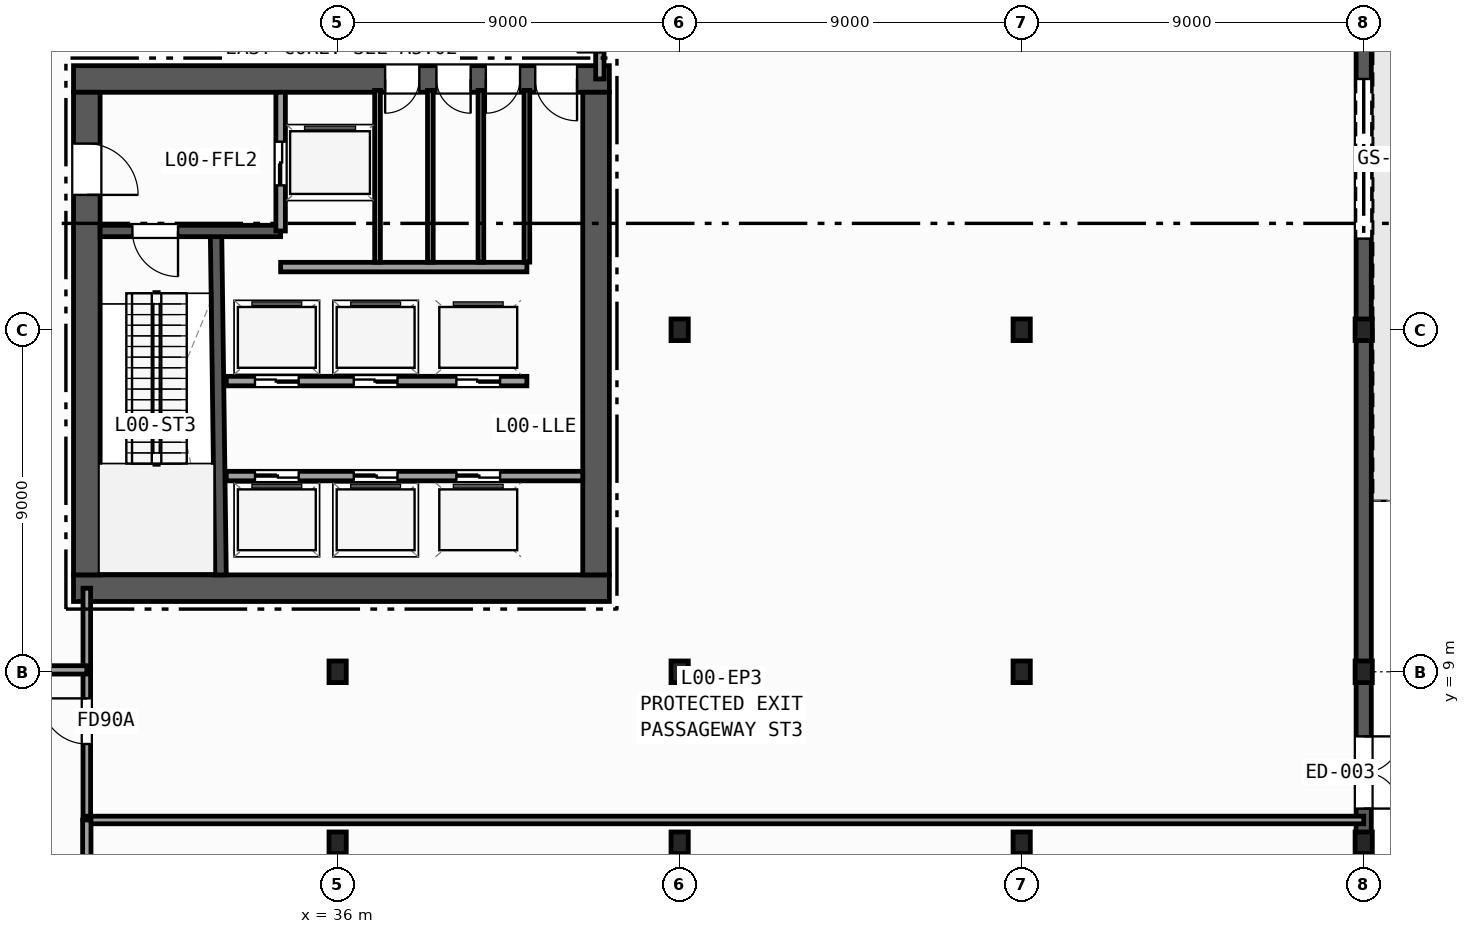
"""IFC4 building model, lengths in metres.
Left out: names, types, materials, properties, quantities, classifications, styles, units other than length and angle.
Written with IfcOpenShell. Run it as: python <this file> out.ifc"""

import sys

from ifc_helpers import new_model, si_unit, direction, frame, frame_2d, origin, origin_2d, place, context, subcontext, project, spatial, rectangle, i_section, extrude, element, fill, save


model = new_model("IFC4")
c1 = context("Model", 3, precision=1e-05, world=origin(), true_north=direction((0.0, 1.0)))
c2 = subcontext(c1, "Body", "Model", "MODEL_VIEW")
j1 = project(units=[si_unit("LENGTHUNIT", "METRE"), si_unit("PLANEANGLEUNIT", "RADIAN")], contexts=[c1])
p1 = place(None, origin())
s1 = spatial("IfcSite", under=j1, at=p1, CompositionType="ELEMENT")
p2 = place(p1, origin())
s2 = spatial("IfcBuilding", under=s1, at=p2, CompositionType="ELEMENT")
p3 = place(p2, origin())
s3 = spatial("IfcBuildingStorey", under=s2, at=p3, CompositionType="ELEMENT", Elevation=0.0)
for number, where, z_axis, x_axis in (
    (1, (36.0, 9.0, 0.0), (0.0, 0.0, 1.0), (1.0, 0.0, 0.0)),
    (2, (45.0, 9.0, 0.0), (0.0, 0.0, 1.0), (1.0, 0.0, 0.0)),
    (3, (45.0, 18.0, 0.0), (0.0, 0.0, 1.0), (1.0, 0.0, 0.0)),
    (4, (54.0, 9.0, 0.0), (0.0, 0.0, 1.0), (1.0, 0.0, 0.0)),
    (5, (54.0, 18.0, 0.0), (0.0, 0.0, 1.0), (1.0, 0.0, 0.0)),
    (6, (63.0, 9.0, 0.0), (0.0, 0.0, 1.0), (1.0, 0.0, 0.0)),
    (7, (63.0, 18.0, 0.0), (0.0, 0.0, 1.0), (1.0, 0.0, 0.0)),
    (8, (36.0, 4.5, 0.0), (0.0, 0.0, 1.0), (1.0, 0.0, 0.0)),
    (9, (45.0, 4.5, 0.0), (0.0, 0.0, 1.0), (1.0, 0.0, 0.0)),
    (10, (54.0, 4.5, 0.0), (0.0, 0.0, 1.0), (1.0, 0.0, 0.0)),
    (11, (63.0, 4.5, 0.0), (0.0, 0.0, 1.0), (1.0, 0.0, 0.0)),
):
    element("IfcColumn", number, at=place(p3, frame(where, z_axis=z_axis, x_axis=x_axis)), inside=s3, PredefinedType="COLUMN", context=c2, shape_type="SweptSolid", body=[
        extrude(i_section(OverallWidth=0.454, OverallDepth=0.569, WebThickness=0.078, FlangeThickness=0.125, FilletRadius=0.015, at=origin_2d()), origin(), (0.0, 0.0, 1.0), 5.8),
    ])
p4 = place(p3, frame((63.0, 54.2, 0.0), z_axis=(0.0, 0.0, 1.0), x_axis=(0.0, -1.0, 0.0)))
e12 = element("IfcWall", 12, at=p4, inside=s3, PredefinedType="SOLIDWALL", context=c2, shape_type="SweptSolid", body=[
    extrude(rectangle(XDim=54.4, YDim=0.4, at=frame_2d((27.2, 0.0))), origin(), (0.0, 0.0, 1.0), 5.48),
])
p5 = place(p4, frame((46.9, 0.0, 0.0)))
e13 = element("IfcOpeningElement", 13, at=p5, cuts=e12, PredefinedType="OPENING", context=c2, shape_type="SweptSolid", body=[
    extrude(rectangle(XDim=1.9, YDim=2.2, at=frame_2d((0.95, 1.1))), frame((0.0, 0.21, 0.0), z_axis=(0.0, -1.0, 0.0), x_axis=(1.0, 0.0, 0.0)), (0.0, 0.0, 1.0), 0.42),
])
p6 = place(p4, frame((12.4, 0.0, 0.0)))
e14 = element("IfcOpeningElement", 14, at=p6, cuts=e12, PredefinedType="OPENING", context=c2, shape_type="SweptSolid", body=[
    extrude(rectangle(XDim=1.6, YDim=2.2, at=frame_2d((0.8, 1.1))), frame((0.0, 0.21, 0.0), z_axis=(0.0, -1.0, 0.0), x_axis=(1.0, 0.0, 0.0)), (0.0, 0.0, 1.0), 0.42),
])
p7 = place(p4, frame((21.4, 0.0, 0.0)))
e15 = element("IfcOpeningElement", 15, at=p7, cuts=e12, PredefinedType="OPENING", context=c2, shape_type="SweptSolid", body=[
    extrude(rectangle(XDim=1.6, YDim=2.2, at=frame_2d((0.8, 1.1))), frame((0.0, 0.21, 0.0), z_axis=(0.0, -1.0, 0.0), x_axis=(1.0, 0.0, 0.0)), (0.0, 0.0, 1.0), 0.42),
])
p8 = place(p4, frame((29.6, 0.0, 0.0)))
e16 = element("IfcOpeningElement", 16, at=p8, cuts=e12, PredefinedType="OPENING", context=c2, shape_type="SweptSolid", body=[
    extrude(rectangle(XDim=4.2, YDim=3.8, at=frame_2d((2.1, 1.9))), frame((0.0, 0.21, 0.0), z_axis=(0.0, -1.0, 0.0), x_axis=(1.0, 0.0, 0.0)), (0.0, 0.0, 1.0), 0.42),
])
p9 = place(p3, frame((43.15, 11.2, 0.0), z_axis=(0.0, 0.0, 1.0), x_axis=(-1.0, 0.0, 0.0)))
e17 = element("IfcWall", 17, at=p9, inside=s3, PredefinedType="SHEAR", context=c2, shape_type="SweptSolid", body=[
    extrude(rectangle(XDim=14.1, YDim=0.7, at=frame_2d((7.05, 0.0))), origin(), (0.0, 0.0, 1.0), 5.48),
])
p10 = place(p3, frame((43.15, 24.6, 0.0), z_axis=(0.0, 0.0, 1.0), x_axis=(-1.0, 0.0, 0.0)))
e18 = element("IfcWall", 18, at=p10, inside=s3, PredefinedType="SHEAR", context=c2, shape_type="SweptSolid", body=[
    extrude(rectangle(XDim=14.1, YDim=0.7, at=frame_2d((7.05, 0.0))), origin(), (0.0, 0.0, 1.0), 5.48),
])
p11 = place(p10, frame((0.85, 0.0, 0.0)))
e19 = element("IfcOpeningElement", 19, at=p11, cuts=e18, PredefinedType="OPENING", context=c2, shape_type="SweptSolid", body=[
    extrude(rectangle(XDim=1.1, YDim=2.15, at=frame_2d((0.55, 1.075))), frame((0.0, 0.36, 0.0), z_axis=(0.0, -1.0, 0.0), x_axis=(1.0, 0.0, 0.0)), (0.0, 0.0, 1.0), 0.72),
])
p12 = place(p10, frame((2.35, 0.0, 0.0)))
e20 = element("IfcOpeningElement", 20, at=p12, cuts=e18, PredefinedType="OPENING", context=c2, shape_type="SweptSolid", body=[
    extrude(rectangle(XDim=0.9, YDim=2.1, at=frame_2d((0.45, 1.05))), frame((0.0, 0.36, 0.0), z_axis=(0.0, -1.0, 0.0), x_axis=(1.0, 0.0, 0.0)), (0.0, 0.0, 1.0), 0.72),
])
p13 = place(p10, frame((3.65, 0.0, 0.0)))
e21 = element("IfcOpeningElement", 21, at=p13, cuts=e18, PredefinedType="OPENING", context=c2, shape_type="SweptSolid", body=[
    extrude(rectangle(XDim=0.9, YDim=2.1, at=frame_2d((0.45, 1.05))), frame((0.0, 0.36, 0.0), z_axis=(0.0, -1.0, 0.0), x_axis=(1.0, 0.0, 0.0)), (0.0, 0.0, 1.0), 0.72),
])
p14 = place(p10, frame((5.0, 0.0, 0.0)))
e22 = element("IfcOpeningElement", 22, at=p14, cuts=e18, PredefinedType="OPENING", context=c2, shape_type="SweptSolid", body=[
    extrude(rectangle(XDim=0.9, YDim=2.1, at=frame_2d((0.45, 1.05))), frame((0.0, 0.36, 0.0), z_axis=(0.0, -1.0, 0.0), x_axis=(1.0, 0.0, 0.0)), (0.0, 0.0, 1.0), 0.72),
])
p15 = place(p3, frame((29.4, 24.25, 0.0), z_axis=(0.0, 0.0, 1.0), x_axis=(0.0, -1.0, 0.0)))
e23 = element("IfcWall", 23, at=p15, inside=s3, PredefinedType="SHEAR", context=c2, shape_type="SweptSolid", body=[
    extrude(rectangle(XDim=12.7, YDim=0.7, at=frame_2d((6.35, 0.0))), origin(), (0.0, 0.0, 1.0), 5.48),
])
p16 = place(p15, frame((1.35, 0.0, 0.0)))
e24 = element("IfcOpeningElement", 24, at=p16, cuts=e23, PredefinedType="OPENING", context=c2, shape_type="SweptSolid", body=[
    extrude(rectangle(XDim=1.35, YDim=2.15, at=frame_2d((0.675, 1.075))), frame((0.0, 0.36, 0.0), z_axis=(0.0, -1.0, 0.0), x_axis=(1.0, 0.0, 0.0)), (0.0, 0.0, 1.0), 0.72),
])
p17 = place(p3, frame((42.8, 11.55, 0.0), z_axis=(0.0, 0.0, 1.0), x_axis=(0.0, 1.0, 0.0)))
e25 = element("IfcWall", 25, at=p17, inside=s3, PredefinedType="SHEAR", context=c2, shape_type="SweptSolid", body=[
    extrude(rectangle(XDim=12.7, YDim=0.7, at=frame_2d((6.35, 0.0))), origin(), (0.0, 0.0, 1.0), 5.48),
])
p18 = place(p3, frame((32.92, 11.55, 0.0), z_axis=(0.0, 0.0, 1.0), x_axis=(-0.01331804616, 0.99991131089, 0.0)))
e26 = element("IfcWall", 26, at=p18, inside=s3, PredefinedType="SHEAR", context=c2, shape_type="SweptSolid", body=[
    extrude(rectangle(XDim=9.001, YDim=0.3, at=frame_2d((4.5, 0.0))), origin(), (0.0, 0.0, 1.0), 5.48),
])
p19 = place(p3, frame((34.5, 20.6, 0.0), z_axis=(0.0, 0.0, 1.0), x_axis=(-1.0, 0.0, 0.0)))
e27 = element("IfcWall", 27, at=p19, inside=s3, PredefinedType="SHEAR", context=c2, shape_type="SweptSolid", body=[
    extrude(rectangle(XDim=4.75, YDim=0.3, at=frame_2d((2.375, 0.0))), origin(), (0.0, 0.0, 1.0), 5.48),
])
p20 = place(p19, frame((2.7, 0.0, 0.0)))
e28 = element("IfcOpeningElement", 28, at=p20, cuts=e27, PredefinedType="OPENING", context=c2, shape_type="SweptSolid", body=[
    extrude(rectangle(XDim=1.2, YDim=2.15, at=frame_2d((0.6, 1.075))), frame((0.0, 0.16, 0.0), z_axis=(0.0, -1.0, 0.0), x_axis=(1.0, 0.0, 0.0)), (0.0, 0.0, 1.0), 0.32),
])
p21 = place(p3, frame((34.5, 20.6, 0.0), z_axis=(0.0, 0.0, 1.0), x_axis=(0.0, 1.0, 0.0)))
e29 = element("IfcWall", 29, at=p21, inside=s3, PredefinedType="PARTITIONING", context=c2, shape_type="SweptSolid", body=[
    extrude(rectangle(XDim=3.65, YDim=0.25, at=frame_2d((1.825, 0.0))), origin(), (0.0, 0.0, 1.0), 5.48),
])
p22 = place(p21, frame((1.2, 0.0, 0.0)))
e30 = element("IfcOpeningElement", 30, at=p22, cuts=e29, PredefinedType="OPENING", context=c2, shape_type="SweptSolid", body=[
    extrude(rectangle(XDim=1.15, YDim=2.15, at=frame_2d((0.575, 1.075))), frame((0.0, 0.135, 0.0), z_axis=(0.0, -1.0, 0.0), x_axis=(1.0, 0.0, 0.0)), (0.0, 0.0, 1.0), 0.27),
])
p23 = place(p3, frame((34.5, 19.65, 0.0), z_axis=(0.0, 0.0, 1.0), x_axis=(1.0, 0.0, 0.0)))
e31 = element("IfcWall", 31, at=p23, inside=s3, PredefinedType="PARTITIONING", context=c2, shape_type="SweptSolid", body=[
    extrude(rectangle(XDim=6.48, YDim=0.25, at=frame_2d((3.24, 0.0))), origin(), (0.0, 0.0, 1.0), 5.48),
])
p24 = place(p3, frame((33.07, 14.15, 0.0), z_axis=(0.0, 0.0, 1.0), x_axis=(1.0, 0.0, 0.0)))
e32 = element("IfcWall", 32, at=p24, inside=s3, PredefinedType="PARTITIONING", context=c2, shape_type="SweptSolid", body=[
    extrude(rectangle(XDim=9.38, YDim=0.25, at=frame_2d((4.69, 0.0))), origin(), (0.0, 0.0, 1.0), 5.48),
])
p25 = place(p24, frame((0.755, 0.0, 0.0)))
e33 = element("IfcOpeningElement", 33, at=p25, cuts=e32, PredefinedType="OPENING", context=c2, shape_type="SweptSolid", body=[
    extrude(rectangle(XDim=1.15, YDim=2.15, at=frame_2d((0.575, 1.075))), frame((0.0, 0.135, 0.0), z_axis=(0.0, -1.0, 0.0), x_axis=(1.0, 0.0, 0.0)), (0.0, 0.0, 1.0), 0.27),
])
p26 = place(p24, frame((3.355, 0.0, 0.0)))
e34 = element("IfcOpeningElement", 34, at=p26, cuts=e32, PredefinedType="OPENING", context=c2, shape_type="SweptSolid", body=[
    extrude(rectangle(XDim=1.15, YDim=2.15, at=frame_2d((0.575, 1.075))), frame((0.0, 0.135, 0.0), z_axis=(0.0, -1.0, 0.0), x_axis=(1.0, 0.0, 0.0)), (0.0, 0.0, 1.0), 0.27),
])
p27 = place(p24, frame((6.055, 0.0, 0.0)))
e35 = element("IfcOpeningElement", 35, at=p27, cuts=e32, PredefinedType="OPENING", context=c2, shape_type="SweptSolid", body=[
    extrude(rectangle(XDim=1.15, YDim=2.15, at=frame_2d((0.575, 1.075))), frame((0.0, 0.135, 0.0), z_axis=(0.0, -1.0, 0.0), x_axis=(1.0, 0.0, 0.0)), (0.0, 0.0, 1.0), 0.27),
])
p28 = place(p3, frame((40.98, 16.65, 0.0), z_axis=(0.0, 0.0, 1.0), x_axis=(-1.0, 0.0, 0.0)))
e36 = element("IfcWall", 36, at=p28, inside=s3, PredefinedType="PARTITIONING", context=c2, shape_type="SweptSolid", body=[
    extrude(rectangle(XDim=7.91, YDim=0.25, at=frame_2d((3.955, 0.0))), origin(), (0.0, 0.0, 1.0), 5.48),
])
p29 = place(p28, frame((6.005, 0.0, 0.0)))
e37 = element("IfcOpeningElement", 37, at=p29, cuts=e36, PredefinedType="OPENING", context=c2, shape_type="SweptSolid", body=[
    extrude(rectangle(XDim=1.15, YDim=2.15, at=frame_2d((0.575, 1.075))), frame((0.0, 0.135, 0.0), z_axis=(0.0, -1.0, 0.0), x_axis=(1.0, 0.0, 0.0)), (0.0, 0.0, 1.0), 0.27),
])
p30 = place(p28, frame((3.405, 0.0, 0.0)))
e38 = element("IfcOpeningElement", 38, at=p30, cuts=e36, PredefinedType="OPENING", context=c2, shape_type="SweptSolid", body=[
    extrude(rectangle(XDim=1.15, YDim=2.15, at=frame_2d((0.575, 1.075))), frame((0.0, 0.135, 0.0), z_axis=(0.0, -1.0, 0.0), x_axis=(1.0, 0.0, 0.0)), (0.0, 0.0, 1.0), 0.27),
])
p31 = place(p28, frame((0.705, 0.0, 0.0)))
e39 = element("IfcOpeningElement", 39, at=p31, cuts=e36, PredefinedType="OPENING", context=c2, shape_type="SweptSolid", body=[
    extrude(rectangle(XDim=1.15, YDim=2.15, at=frame_2d((0.575, 1.075))), frame((0.0, 0.135, 0.0), z_axis=(0.0, -1.0, 0.0), x_axis=(1.0, 0.0, 0.0)), (0.0, 0.0, 1.0), 0.27),
])
for number, where, z_axis, x_axis in (
    (40, (37.05, 19.78, 0.0), (0.0, 0.0, 1.0), (0.0, 1.0, 0.0)),
    (41, (38.44, 19.78, 0.0), (0.0, 0.0, 1.0), (0.0, 1.0, 0.0)),
    (42, (39.77, 19.78, 0.0), (0.0, 0.0, 1.0), (0.0, 1.0, 0.0)),
    (43, (40.98, 19.78, 0.0), (0.0, 0.0, 1.0), (0.0, 1.0, 0.0)),
):
    element("IfcWall", number, at=place(p3, frame(where, z_axis=z_axis, x_axis=x_axis)), inside=s3, PredefinedType="PARTITIONING", context=c2, shape_type="SweptSolid", body=[
        extrude(rectangle(XDim=4.52, YDim=0.15, at=frame_2d((2.26, 0.0))), origin(), (0.0, 0.0, 1.0), 5.48),
    ])
p32 = place(p3, frame((29.4, 5.1, 0.0), z_axis=(0.0, 0.0, 1.0), x_axis=(0.0, 1.0, 0.0)))
e44 = element("IfcWall", 44, at=p32, inside=s3, PredefinedType="PARTITIONING", context=c2, shape_type="SweptSolid", body=[
    extrude(rectangle(XDim=6.1, YDim=0.2, at=frame_2d((3.05, 0.0))), origin(), (0.0, 0.0, 1.0), 4.533),
])
p33 = place(p32, frame((2.0, 0.0, 0.0)))
e45 = element("IfcOpeningElement", 45, at=p33, cuts=e44, PredefinedType="OPENING", context=c2, shape_type="SweptSolid", body=[
    extrude(rectangle(XDim=1.2, YDim=2.15, at=frame_2d((0.6, 1.075))), frame((0.0, 0.11, 0.0), z_axis=(0.0, -1.0, 0.0), x_axis=(1.0, 0.0, 0.0)), (0.0, 0.0, 1.0), 0.22),
])
p34 = place(p3, frame((29.4, 5.1, 0.0), z_axis=(0.0, 0.0, 1.0), x_axis=(1.0, 0.0, 0.0)))
e46 = element("IfcWall", 46, at=p34, inside=s3, PredefinedType="PARTITIONING", context=c2, shape_type="SweptSolid", body=[
    extrude(rectangle(XDim=33.6, YDim=0.2, at=frame_2d((16.8, 0.0))), origin(), (0.0, 0.0, 1.0), 4.605),
])
p35 = place(p3, frame((10.75, 9.05, 0.0), z_axis=(0.0, 0.0, 1.0), x_axis=(1.0, 0.0, 0.0)))
e47 = element("IfcWall", 47, at=p35, inside=s3, PredefinedType="PARTITIONING", context=c2, shape_type="SweptSolid", body=[
    extrude(rectangle(XDim=18.65, YDim=0.22, at=frame_2d((9.325, 0.0))), origin(), (0.0, 0.0, 1.0), 4.533),
])
p36 = place(p35, frame((14.4, 0.0, 0.0)))
e48 = element("IfcOpeningElement", 48, at=p36, cuts=e47, PredefinedType="OPENING", context=c2, shape_type="SweptSolid", body=[
    extrude(rectangle(XDim=1.1, YDim=2.15, at=frame_2d((0.55, 1.075))), frame((0.0, 0.12, 0.0), z_axis=(0.0, -1.0, 0.0), x_axis=(1.0, 0.0, 0.0)), (0.0, 0.0, 1.0), 0.24),
])
p37 = place(p3, frame((29.4, 0.0, 0.0), z_axis=(0.0, 0.0, 1.0), x_axis=(0.0, 1.0, 0.0)))
e49 = element("IfcWall", 49, at=p37, inside=s3, PredefinedType="PARTITIONING", context=c2, shape_type="SweptSolid", body=[
    extrude(rectangle(XDim=5.1, YDim=0.22, at=frame_2d((2.55, 0.0))), origin(), (0.0, 0.0, 1.0), 4.533),
])
p38 = place(p37, frame((2.0, 0.0, 0.0)))
e50 = element("IfcOpeningElement", 50, at=p38, cuts=e49, PredefinedType="OPENING", context=c2, shape_type="SweptSolid", body=[
    extrude(rectangle(XDim=1.1, YDim=2.15, at=frame_2d((0.55, 1.075))), frame((0.0, 0.12, 0.0), z_axis=(0.0, -1.0, 0.0), x_axis=(1.0, 0.0, 0.0)), (0.0, 0.0, 1.0), 0.24),
])
p39 = place(p3, frame((42.9, 24.6, 0.0), z_axis=(0.0, 0.0, 1.0), x_axis=(0.0, 1.0, 0.0)))
e51 = element("IfcWall", 51, at=p39, inside=s3, PredefinedType="PARTITIONING", context=c2, shape_type="SweptSolid", body=[
    extrude(rectangle(XDim=29.4, YDim=0.22, at=frame_2d((14.7, 0.0))), origin(), (0.0, 0.0, 1.0), 4.533),
])
p40 = place(p39, frame((0.7, 0.0, 0.0)))
e52 = element("IfcOpeningElement", 52, at=p40, cuts=e51, PredefinedType="OPENING", context=c2, shape_type="SweptSolid", body=[
    extrude(rectangle(XDim=1.2, YDim=2.15, at=frame_2d((0.6, 1.075))), frame((0.0, 0.12, 0.0), z_axis=(0.0, -1.0, 0.0), x_axis=(1.0, 0.0, 0.0)), (0.0, 0.0, 1.0), 0.24),
])
p41 = place(p5, origin())
e53 = element("IfcDoor", 53, at=p41, inside=s3, OperationType="DOUBLE_DOOR_SINGLE_SWING", PredefinedType="DOOR", context=c2, shape_type="SweptSolid", body=[
    extrude(rectangle(XDim=1.9, YDim=2.2, at=frame_2d((0.95, 1.1))), frame((0.0, 0.025, 0.0), z_axis=(0.0, -1.0, 0.0), x_axis=(1.0, 0.0, 0.0)), (0.0, 0.0, 1.0), 0.05),
])
fill(e13, e53)
p42 = place(p8, origin())
e54 = element("IfcDoor", 54, at=p42, inside=s3, OperationType="ROLLINGUP", PredefinedType="GATE", context=c2, shape_type="SweptSolid", body=[
    extrude(rectangle(XDim=4.2, YDim=3.8, at=frame_2d((2.1, 1.9))), frame((0.0, 0.025, 0.0), z_axis=(0.0, -1.0, 0.0), x_axis=(1.0, 0.0, 0.0)), (0.0, 0.0, 1.0), 0.05),
])
fill(e16, e54)
p43 = place(p20, origin())
e55 = element("IfcDoor", 55, at=p43, inside=s3, OperationType="SINGLE_SWING_LEFT", PredefinedType="DOOR", context=c2, shape_type="SweptSolid", body=[
    extrude(rectangle(XDim=1.2, YDim=2.15, at=frame_2d((0.6, 1.075))), frame((0.0, 0.025, 0.0), z_axis=(0.0, -1.0, 0.0), x_axis=(1.0, 0.0, 0.0)), (0.0, 0.0, 1.0), 0.05),
])
fill(e28, e55)
p44 = place(p16, origin())
e56 = element("IfcDoor", 56, at=p44, inside=s3, OperationType="SINGLE_SWING_RIGHT", PredefinedType="DOOR", context=c2, shape_type="SweptSolid", body=[
    extrude(rectangle(XDim=1.35, YDim=2.15, at=frame_2d((0.675, 1.075))), frame((0.0, 0.025, 0.0), z_axis=(0.0, -1.0, 0.0), x_axis=(1.0, 0.0, 0.0)), (0.0, 0.0, 1.0), 0.05),
])
fill(e24, e56)
p45 = place(p11, origin())
e57 = element("IfcDoor", 57, at=p45, inside=s3, OperationType="SINGLE_SWING_LEFT", PredefinedType="DOOR", context=c2, shape_type="SweptSolid", body=[
    extrude(rectangle(XDim=1.1, YDim=2.15, at=frame_2d((0.55, 1.075))), frame((0.0, 0.025, 0.0), z_axis=(0.0, -1.0, 0.0), x_axis=(1.0, 0.0, 0.0)), (0.0, 0.0, 1.0), 0.05),
])
fill(e19, e57)
p46 = place(p12, origin())
e58 = element("IfcDoor", 58, at=p46, inside=s3, OperationType="SINGLE_SWING_RIGHT", PredefinedType="DOOR", context=c2, shape_type="SweptSolid", body=[
    extrude(rectangle(XDim=0.9, YDim=2.1, at=frame_2d((0.45, 1.05))), frame((0.0, 0.025, 0.0), z_axis=(0.0, -1.0, 0.0), x_axis=(1.0, 0.0, 0.0)), (0.0, 0.0, 1.0), 0.05),
])
fill(e20, e58)
p47 = place(p13, origin())
e59 = element("IfcDoor", 59, at=p47, inside=s3, OperationType="SINGLE_SWING_LEFT", PredefinedType="DOOR", context=c2, shape_type="SweptSolid", body=[
    extrude(rectangle(XDim=0.9, YDim=2.1, at=frame_2d((0.45, 1.05))), frame((0.0, 0.025, 0.0), z_axis=(0.0, -1.0, 0.0), x_axis=(1.0, 0.0, 0.0)), (0.0, 0.0, 1.0), 0.05),
])
fill(e21, e59)
p48 = place(p14, origin())
e60 = element("IfcDoor", 60, at=p48, inside=s3, OperationType="SINGLE_SWING_RIGHT", PredefinedType="DOOR", context=c2, shape_type="SweptSolid", body=[
    extrude(rectangle(XDim=0.9, YDim=2.1, at=frame_2d((0.45, 1.05))), frame((0.0, 0.025, 0.0), z_axis=(0.0, -1.0, 0.0), x_axis=(1.0, 0.0, 0.0)), (0.0, 0.0, 1.0), 0.05),
])
fill(e22, e60)
p49 = place(p22, origin())
e61 = element("IfcDoor", 61, at=p49, inside=s3, OperationType="DOUBLE_DOOR_SLIDING", PredefinedType="DOOR", context=c2, shape_type="SweptSolid", body=[
    extrude(rectangle(XDim=1.15, YDim=2.15, at=frame_2d((0.575, 1.075))), frame((0.0, 0.025, 0.0), z_axis=(0.0, -1.0, 0.0), x_axis=(1.0, 0.0, 0.0)), (0.0, 0.0, 1.0), 0.05),
])
fill(e30, e61)
p50 = place(p25, origin())
e62 = element("IfcDoor", 62, at=p50, inside=s3, OperationType="DOUBLE_DOOR_SLIDING", PredefinedType="DOOR", context=c2, shape_type="SweptSolid", body=[
    extrude(rectangle(XDim=1.15, YDim=2.15, at=frame_2d((0.575, 1.075))), frame((0.0, 0.025, 0.0), z_axis=(0.0, -1.0, 0.0), x_axis=(1.0, 0.0, 0.0)), (0.0, 0.0, 1.0), 0.05),
])
fill(e33, e62)
p51 = place(p26, origin())
e63 = element("IfcDoor", 63, at=p51, inside=s3, OperationType="DOUBLE_DOOR_SLIDING", PredefinedType="DOOR", context=c2, shape_type="SweptSolid", body=[
    extrude(rectangle(XDim=1.15, YDim=2.15, at=frame_2d((0.575, 1.075))), frame((0.0, 0.025, 0.0), z_axis=(0.0, -1.0, 0.0), x_axis=(1.0, 0.0, 0.0)), (0.0, 0.0, 1.0), 0.05),
])
fill(e34, e63)
p52 = place(p29, origin())
e64 = element("IfcDoor", 64, at=p52, inside=s3, OperationType="DOUBLE_DOOR_SLIDING", PredefinedType="DOOR", context=c2, shape_type="SweptSolid", body=[
    extrude(rectangle(XDim=1.15, YDim=2.15, at=frame_2d((0.575, 1.075))), frame((0.0, 0.025, 0.0), z_axis=(0.0, -1.0, 0.0), x_axis=(1.0, 0.0, 0.0)), (0.0, 0.0, 1.0), 0.05),
])
fill(e37, e64)
p53 = place(p30, origin())
e65 = element("IfcDoor", 65, at=p53, inside=s3, OperationType="DOUBLE_DOOR_SLIDING", PredefinedType="DOOR", context=c2, shape_type="SweptSolid", body=[
    extrude(rectangle(XDim=1.15, YDim=2.15, at=frame_2d((0.575, 1.075))), frame((0.0, 0.025, 0.0), z_axis=(0.0, -1.0, 0.0), x_axis=(1.0, 0.0, 0.0)), (0.0, 0.0, 1.0), 0.05),
])
fill(e38, e65)
p54 = place(p27, origin())
e66 = element("IfcDoor", 66, at=p54, inside=s3, OperationType="DOUBLE_DOOR_SLIDING", PredefinedType="DOOR", context=c2, shape_type="SweptSolid", body=[
    extrude(rectangle(XDim=1.15, YDim=2.15, at=frame_2d((0.575, 1.075))), frame((0.0, 0.025, 0.0), z_axis=(0.0, -1.0, 0.0), x_axis=(1.0, 0.0, 0.0)), (0.0, 0.0, 1.0), 0.05),
])
fill(e35, e66)
p55 = place(p31, origin())
e67 = element("IfcDoor", 67, at=p55, inside=s3, OperationType="DOUBLE_DOOR_SLIDING", PredefinedType="DOOR", context=c2, shape_type="SweptSolid", body=[
    extrude(rectangle(XDim=1.15, YDim=2.15, at=frame_2d((0.575, 1.075))), frame((0.0, 0.025, 0.0), z_axis=(0.0, -1.0, 0.0), x_axis=(1.0, 0.0, 0.0)), (0.0, 0.0, 1.0), 0.05),
])
fill(e39, e67)
p56 = place(p33, origin())
e68 = element("IfcDoor", 68, at=p56, inside=s3, OperationType="SINGLE_SWING_RIGHT", PredefinedType="DOOR", context=c2, shape_type="SweptSolid", body=[
    extrude(rectangle(XDim=1.2, YDim=2.15, at=frame_2d((0.6, 1.075))), frame((0.0, 0.025, 0.0), z_axis=(0.0, -1.0, 0.0), x_axis=(1.0, 0.0, 0.0)), (0.0, 0.0, 1.0), 0.05),
])
fill(e45, e68)
save(model, sys.argv[1])
